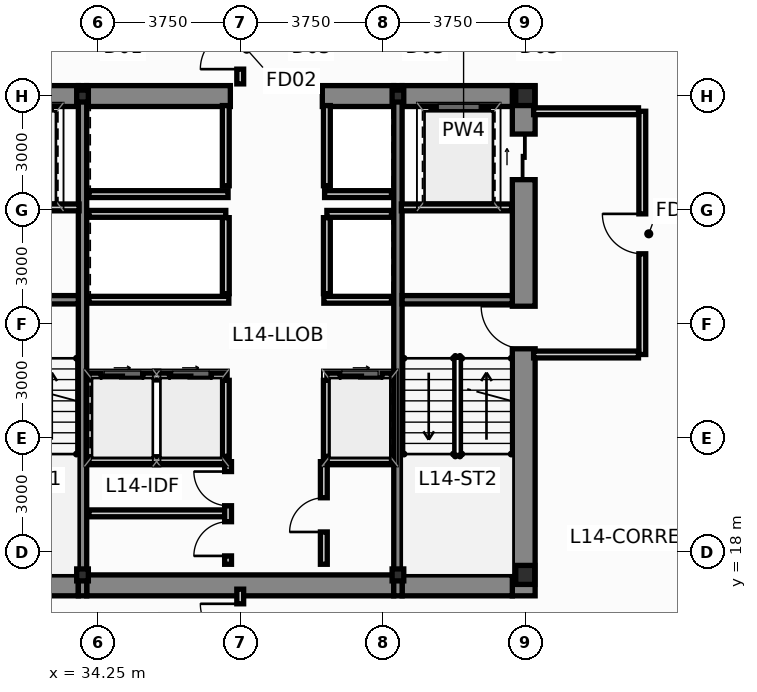
"""IFC4 building model, lengths in metres.
Left out: names, types, materials, properties, quantities, classifications, styles, units other than length and angle.
Written with IfcOpenShell. Run it as: python <this file> out.ifc"""

import sys

from ifc_helpers import new_model, si_unit, direction, frame, frame_2d, origin, origin_2d, place, context, subcontext, project, spatial, rectangle, i_section, extrude, source, transform, mapped, element, fill, save


model = new_model("IFC4")
c1 = context("Model", 3, precision=1e-05, world=origin(), true_north=direction((0.0, 1.0)))
c2 = subcontext(c1, "Body", "Model", "MODEL_VIEW")
j1 = project(units=[si_unit("LENGTHUNIT", "METRE"), si_unit("PLANEANGLEUNIT", "RADIAN")], contexts=[c1])
p1 = place(None, origin())
s1 = spatial("IfcSite", under=j1, at=p1, CompositionType="ELEMENT")
p2 = place(p1, origin())
s2 = spatial("IfcBuilding", under=s1, at=p2, CompositionType="ELEMENT")
p3 = place(p2, frame((0.0, 0.0, 56.8)))
s3 = spatial("IfcBuildingStorey", under=s2, at=p3, CompositionType="ELEMENT", Elevation=56.8)
m1 = source(origin(), c2, "Body", "SweptSolid", [
    extrude(i_section(OverallWidth=0.5, OverallDepth=0.5, WebThickness=0.028, FlangeThickness=0.04, at=origin_2d()), origin(), (0.0, 0.0, 1.0), 3.65),
])
for number, where, z_axis, x_axis in (
    (1, (45.5, 17.4, 0.0), (0.0, 0.0, 1.0), (1.0, 0.0, 0.0)),
    (2, (45.5, 30.0, 0.0), (0.0, 0.0, 1.0), (1.0, 0.0, 0.0)),
):
    element("IfcColumn", number, at=place(p3, frame(where, z_axis=z_axis, x_axis=x_axis)), inside=s3, PredefinedType="COLUMN", context=c2, shape_type="MappedRepresentation", body=[
        mapped(m1, transform((0.0, 0.0, 0.0), scale=1.0)),
    ])
m2 = source(origin(), c2, "Body", "SweptSolid", [
    extrude(i_section(OverallWidth=0.307, OverallDepth=0.315, WebThickness=0.012, FlangeThickness=0.019, at=origin_2d()), origin(), (0.0, 0.0, 1.0), 3.65),
])
for number, where, z_axis, x_axis in (
    (3, (33.85, 17.4, 0.0), (0.0, 0.0, 1.0), (1.0, 0.0, 0.0)),
    (4, (42.15, 17.4, 0.0), (0.0, 0.0, 1.0), (1.0, 0.0, 0.0)),
    (5, (33.85, 30.0, 0.0), (0.0, 0.0, 1.0), (1.0, 0.0, 0.0)),
    (6, (42.15, 30.0, 0.0), (0.0, 0.0, 1.0), (1.0, 0.0, 0.0)),
):
    element("IfcColumn", number, at=place(p3, frame(where, z_axis=z_axis, x_axis=x_axis)), inside=s3, PredefinedType="COLUMN", context=c2, shape_type="MappedRepresentation", body=[
        mapped(m2, transform((0.0, 0.0, 0.0), scale=1.0)),
    ])
p4 = place(p3, frame((45.46, 16.85, 0.0), z_axis=(0.0, 0.0, 1.0), x_axis=(0.0, 1.0, 0.0)))
e7 = element("IfcWall", 7, at=p4, inside=s3, PredefinedType="SHEAR", context=c2, shape_type="SweptSolid", body=[
    extrude(rectangle(XDim=13.425, YDim=0.6, at=frame_2d((6.712, 0.0))), origin(), (0.0, 0.0, 1.0), 3.65),
])
p5 = place(p4, frame((6.5, 0.0, 0.0)))
e8 = element("IfcOpeningElement", 8, at=p5, cuts=e7, PredefinedType="OPENING", context=c2, shape_type="SweptSolid", body=[
    extrude(rectangle(XDim=1.12, YDim=2.15, at=frame_2d((0.56, 1.075))), frame((0.0, 0.312, 0.0), z_axis=(0.0, -1.0, 0.0), x_axis=(1.0, 0.0, 0.0)), (0.0, 0.0, 1.0), 0.624),
])
p6 = place(p4, frame((10.95, 0.0, 0.0)))
e9 = element("IfcOpeningElement", 9, at=p6, cuts=e7, PredefinedType="OPENING", context=c2, shape_type="SweptSolid", body=[
    extrude(rectangle(XDim=1.2, YDim=2.2, at=frame_2d((0.6, 1.1))), frame((0.0, 0.312, 0.0), z_axis=(0.0, -1.0, 0.0), x_axis=(1.0, 0.0, 0.0)), (0.0, 0.0, 1.0), 0.624),
])
p7 = place(p3, frame((30.84, 17.125, 0.0), z_axis=(0.0, 0.0, 1.0), x_axis=(1.0, 0.0, 0.0)))
e10 = element("IfcWall", 10, at=p7, inside=s3, PredefinedType="SHEAR", context=c2, shape_type="SweptSolid", body=[
    extrude(rectangle(XDim=2.9, YDim=0.55, at=frame_2d((1.45, 0.0))), origin(), (0.0, 0.0, 1.0), 3.65),
])
p8 = place(p3, frame((33.96, 17.125, 0.0), z_axis=(0.0, 0.0, 1.0), x_axis=(1.0, 0.0, 0.0)))
e11 = element("IfcWall", 11, at=p8, inside=s3, PredefinedType="SHEAR", context=c2, shape_type="SweptSolid", body=[
    extrude(rectangle(XDim=8.08, YDim=0.55, at=frame_2d((4.04, 0.0))), origin(), (0.0, 0.0, 1.0), 3.65),
])
for number, where, z_axis, x_axis in (
    (12, (42.26, 17.125, 0.0), (0.0, 0.0, 1.0), (1.0, 0.0, 0.0)),
    (13, (30.84, 30.0, 0.0), (0.0, 0.0, 1.0), (1.0, 0.0, 0.0)),
):
    element("IfcWall", number, at=place(p3, frame(where, z_axis=z_axis, x_axis=x_axis)), inside=s3, PredefinedType="SHEAR", context=c2, shape_type="SweptSolid", body=[
        extrude(rectangle(XDim=2.9, YDim=0.55, at=frame_2d((1.45, 0.0))), origin(), (0.0, 0.0, 1.0), 3.65),
    ])
p9 = place(p3, frame((33.96, 30.0, 0.0), z_axis=(0.0, 0.0, 1.0), x_axis=(1.0, 0.0, 0.0)))
e14 = element("IfcWall", 14, at=p9, inside=s3, PredefinedType="SHEAR", context=c2, shape_type="SweptSolid", body=[
    extrude(rectangle(XDim=3.78, YDim=0.55, at=frame_2d((1.89, 0.0))), origin(), (0.0, 0.0, 1.0), 3.65),
])
p10 = place(p3, frame((40.16, 30.0, 0.0), z_axis=(0.0, 0.0, 1.0), x_axis=(1.0, 0.0, 0.0)))
e15 = element("IfcWall", 15, at=p10, inside=s3, PredefinedType="SHEAR", context=c2, shape_type="SweptSolid", body=[
    extrude(rectangle(XDim=1.88, YDim=0.55, at=frame_2d((0.94, 0.0))), origin(), (0.0, 0.0, 1.0), 3.65),
])
p11 = place(p3, frame((42.26, 30.0, 0.0), z_axis=(0.0, 0.0, 1.0), x_axis=(1.0, 0.0, 0.0)))
e16 = element("IfcWall", 16, at=p11, inside=s3, PredefinedType="SHEAR", context=c2, shape_type="SweptSolid", body=[
    extrude(rectangle(XDim=2.9, YDim=0.55, at=frame_2d((1.45, 0.0))), origin(), (0.0, 0.0, 1.0), 3.65),
])
for number, where, z_axis, x_axis in (
    (17, (33.85, 16.85, 0.0), (0.0, 0.0, 1.0), (0.0, 1.0, 0.0)),
    (18, (42.15, 16.85, 0.0), (0.0, 0.0, 1.0), (0.0, 1.0, 0.0)),
):
    element("IfcWall", number, at=place(p3, frame(where, z_axis=z_axis, x_axis=x_axis)), inside=s3, PredefinedType="SHEAR", context=c2, shape_type="SweptSolid", body=[
        extrude(rectangle(XDim=13.425, YDim=0.22, at=frame_2d((6.712, 0.0))), origin(), (0.0, 0.0, 1.0), 3.65),
    ])
for number, where, z_axis, x_axis in (
    (19, (30.84, 24.64, 0.0), (0.0, 0.0, 1.0), (1.0, 0.0, 0.0)),
    (20, (42.26, 24.64, 0.0), (0.0, 0.0, 1.0), (1.0, 0.0, 0.0)),
):
    element("IfcWall", number, at=place(p3, frame(where, z_axis=z_axis, x_axis=x_axis)), inside=s3, PredefinedType="SHEAR", context=c2, shape_type="SweptSolid", body=[
        extrude(rectangle(XDim=2.9, YDim=0.22, at=frame_2d((1.45, 0.0))), origin(), (0.0, 0.0, 1.0), 3.65),
    ])
p12 = place(p3, frame((34.02, 22.62, 0.0), z_axis=(0.0, 0.0, 1.0), x_axis=(1.0, 0.0, 0.0)))
e21 = element("IfcWall", 21, at=p12, inside=s3, PredefinedType="PARTITIONING", context=c2, shape_type="SweptSolid", body=[
    extrude(rectangle(XDim=3.6, YDim=0.18, at=frame_2d((1.8, 0.0))), origin(), (0.0, 0.0, 1.0), 3.4),
])
p13 = place(p12, frame((0.32, 0.0, 0.0)))
e22 = element("IfcOpeningElement", 22, at=p13, cuts=e21, PredefinedType="OPENING", context=c2, shape_type="SweptSolid", body=[
    extrude(rectangle(XDim=1.1, YDim=2.2, at=frame_2d((0.55, 1.1))), frame((0.0, 0.102, 0.0), z_axis=(0.0, -1.0, 0.0), x_axis=(1.0, 0.0, 0.0)), (0.0, 0.0, 1.0), 0.204),
])
p14 = place(p12, frame((2.12, 0.0, 0.0)))
e23 = element("IfcOpeningElement", 23, at=p14, cuts=e21, PredefinedType="OPENING", context=c2, shape_type="SweptSolid", body=[
    extrude(rectangle(XDim=1.1, YDim=2.2, at=frame_2d((0.55, 1.1))), frame((0.0, 0.102, 0.0), z_axis=(0.0, -1.0, 0.0), x_axis=(1.0, 0.0, 0.0)), (0.0, 0.0, 1.0), 0.204),
])
p15 = place(p3, frame((40.28, 22.62, 0.0), z_axis=(0.0, 0.0, 1.0), x_axis=(1.0, 0.0, 0.0)))
e24 = element("IfcWall", 24, at=p15, inside=s3, PredefinedType="PARTITIONING", context=c2, shape_type="SweptSolid", body=[
    extrude(rectangle(XDim=1.7, YDim=0.18, at=frame_2d((0.85, 0.0))), origin(), (0.0, 0.0, 1.0), 3.4),
])
p16 = place(p15, frame((0.35, 0.0, 0.0)))
e25 = element("IfcOpeningElement", 25, at=p16, cuts=e24, PredefinedType="OPENING", context=c2, shape_type="SweptSolid", body=[
    extrude(rectangle(XDim=1.1, YDim=2.2, at=frame_2d((0.55, 1.1))), frame((0.0, 0.102, 0.0), z_axis=(0.0, -1.0, 0.0), x_axis=(1.0, 0.0, 0.0)), (0.0, 0.0, 1.0), 0.204),
])
for number, where, z_axis, x_axis in (
    (26, (37.62, 20.52, 0.0), (0.0, 0.0, 1.0), (0.0, 1.0, 0.0)),
    (27, (40.28, 20.52, 0.0), (0.0, 0.0, 1.0), (0.0, 1.0, 0.0)),
):
    element("IfcWall", number, at=place(p3, frame(where, z_axis=z_axis, x_axis=x_axis)), inside=s3, PredefinedType="PARTITIONING", context=c2, shape_type="SweptSolid", body=[
        extrude(rectangle(XDim=2.0, YDim=0.18, at=frame_2d((1.0, 0.0))), origin(), (0.0, 0.0, 1.0), 3.4),
    ])
p17 = place(p3, frame((34.02, 26.9, 0.0), z_axis=(0.0, 0.0, 1.0), x_axis=(1.0, 0.0, 0.0)))
e28 = element("IfcWall", 28, at=p17, inside=s3, PredefinedType="PARTITIONING", context=c2, shape_type="SweptSolid", body=[
    extrude(rectangle(XDim=3.6, YDim=0.18, at=frame_2d((1.8, 0.0))), origin(), (0.0, 0.0, 1.0), 3.4),
])
p18 = place(p3, frame((40.28, 26.9, 0.0), z_axis=(0.0, 0.0, 1.0), x_axis=(1.0, 0.0, 0.0)))
e29 = element("IfcWall", 29, at=p18, inside=s3, PredefinedType="PARTITIONING", context=c2, shape_type="SweptSolid", body=[
    extrude(rectangle(XDim=1.7, YDim=0.18, at=frame_2d((0.85, 0.0))), origin(), (0.0, 0.0, 1.0), 3.4),
])
for number, where, z_axis, x_axis in (
    (30, (37.62, 24.8, 0.0), (0.0, 0.0, 1.0), (0.0, 1.0, 0.0)),
    (31, (40.28, 24.8, 0.0), (0.0, 0.0, 1.0), (0.0, 1.0, 0.0)),
):
    element("IfcWall", number, at=place(p3, frame(where, z_axis=z_axis, x_axis=x_axis)), inside=s3, PredefinedType="PARTITIONING", context=c2, shape_type="SweptSolid", body=[
        extrude(rectangle(XDim=2.0, YDim=0.18, at=frame_2d((1.0, 0.0))), origin(), (0.0, 0.0, 1.0), 3.4),
    ])
p19 = place(p3, frame((34.02, 24.64, 0.0), z_axis=(0.0, 0.0, 1.0), x_axis=(1.0, 0.0, 0.0)))
e32 = element("IfcWall", 32, at=p19, inside=s3, PredefinedType="PARTITIONING", context=c2, shape_type="SweptSolid", body=[
    extrude(rectangle(XDim=3.68, YDim=0.18, at=frame_2d((1.84, 0.0))), origin(), (0.0, 0.0, 1.0), 3.4),
])
p20 = place(p3, frame((40.2, 24.64, 0.0), z_axis=(0.0, 0.0, 1.0), x_axis=(1.0, 0.0, 0.0)))
e33 = element("IfcWall", 33, at=p20, inside=s3, PredefinedType="PARTITIONING", context=c2, shape_type="SweptSolid", body=[
    extrude(rectangle(XDim=1.78, YDim=0.18, at=frame_2d((0.89, 0.0))), origin(), (0.0, 0.0, 1.0), 3.4),
])
p21 = place(p3, frame((34.02, 27.42, 0.0), z_axis=(0.0, 0.0, 1.0), x_axis=(1.0, 0.0, 0.0)))
e34 = element("IfcWall", 34, at=p21, inside=s3, PredefinedType="PARTITIONING", context=c2, shape_type="SweptSolid", body=[
    extrude(rectangle(XDim=3.66, YDim=0.18, at=frame_2d((1.83, 0.0))), origin(), (0.0, 0.0, 1.0), 3.4),
])
p22 = place(p3, frame((40.22, 27.42, 0.0), z_axis=(0.0, 0.0, 1.0), x_axis=(1.0, 0.0, 0.0)))
e35 = element("IfcWall", 35, at=p22, inside=s3, PredefinedType="PARTITIONING", context=c2, shape_type="SweptSolid", body=[
    extrude(rectangle(XDim=1.76, YDim=0.18, at=frame_2d((0.88, 0.0))), origin(), (0.0, 0.0, 1.0), 3.4),
])
for number, where, z_axis, x_axis in (
    (36, (37.62, 27.64, 0.0), (0.0, 0.0, 1.0), (0.0, 1.0, 0.0)),
    (37, (40.28, 27.64, 0.0), (0.0, 0.0, 1.0), (0.0, 1.0, 0.0)),
):
    element("IfcWall", number, at=place(p3, frame(where, z_axis=z_axis, x_axis=x_axis)), inside=s3, PredefinedType="PARTITIONING", context=c2, shape_type="SweptSolid", body=[
        extrude(rectangle(XDim=2.11, YDim=0.18, at=frame_2d((1.055, 0.0))), origin(), (0.0, 0.0, 1.0), 3.4),
    ])
p23 = place(p3, frame((48.58, 23.2, 0.0), z_axis=(0.0, 0.0, 1.0), x_axis=(0.0, 1.0, 0.0)))
e38 = element("IfcWall", 38, at=p23, inside=s3, PredefinedType="PARTITIONING", context=c2, shape_type="SweptSolid", body=[
    extrude(rectangle(XDim=6.4, YDim=0.18, at=frame_2d((3.2, 0.0))), origin(), (0.0, 0.0, 1.0), 3.4),
])
p24 = place(p23, frame((2.65, 0.0, 0.0)))
e39 = element("IfcOpeningElement", 39, at=p24, cuts=e38, PredefinedType="OPENING", context=c2, shape_type="SweptSolid", body=[
    extrude(rectangle(XDim=1.05, YDim=2.15, at=frame_2d((0.525, 1.075))), frame((0.0, 0.102, 0.0), z_axis=(0.0, -1.0, 0.0), x_axis=(1.0, 0.0, 0.0)), (0.0, 0.0, 1.0), 0.204),
])
p25 = place(p3, frame((45.72, 23.2, 0.0), z_axis=(0.0, 0.0, 1.0), x_axis=(1.0, 0.0, 0.0)))
e40 = element("IfcWall", 40, at=p25, inside=s3, PredefinedType="PARTITIONING", context=c2, shape_type="SweptSolid", body=[
    extrude(rectangle(XDim=2.76, YDim=0.18, at=frame_2d((1.38, 0.0))), origin(), (0.0, 0.0, 1.0), 3.4),
])
p26 = place(p3, frame((45.72, 29.6, 0.0), z_axis=(0.0, 0.0, 1.0), x_axis=(1.0, 0.0, 0.0)))
e41 = element("IfcWall", 41, at=p26, inside=s3, PredefinedType="PARTITIONING", context=c2, shape_type="SweptSolid", body=[
    extrude(rectangle(XDim=2.76, YDim=0.18, at=frame_2d((1.38, 0.0))), origin(), (0.0, 0.0, 1.0), 2.783),
])
for number, where, z_axis, x_axis in (
    (42, (30.86, 27.07, 0.0), (0.0, 0.0, 1.0), (1.0, 0.0, 0.0)),
    (43, (42.24, 27.07, 0.0), (0.0, 0.0, 1.0), (1.0, 0.0, 0.0)),
):
    element("IfcWall", number, at=place(p3, frame(where, z_axis=z_axis, x_axis=x_axis)), inside=s3, PredefinedType="PARTITIONING", context=c2, shape_type="SweptSolid", body=[
        extrude(rectangle(XDim=2.9, YDim=0.18, at=frame_2d((1.45, 0.0))), origin(), (0.0, 0.0, 1.0), 3.4),
    ])
p27 = place(p3, frame((34.02, 20.42, 0.0), z_axis=(0.0, 0.0, 1.0), x_axis=(1.0, 0.0, 0.0)))
e44 = element("IfcWall", 44, at=p27, inside=s3, PredefinedType="PARTITIONING", context=c2, shape_type="SweptSolid", body=[
    extrude(rectangle(XDim=3.64, YDim=0.18, at=frame_2d((1.82, 0.0))), origin(), (0.0, 0.0, 1.0), 3.4),
])
p28 = place(p3, frame((40.22, 20.42, 0.0), z_axis=(0.0, 0.0, 1.0), x_axis=(1.0, 0.0, 0.0)))
e45 = element("IfcWall", 45, at=p28, inside=s3, PredefinedType="PARTITIONING", context=c2, shape_type="SweptSolid", body=[
    extrude(rectangle(XDim=1.76, YDim=0.18, at=frame_2d((0.88, 0.0))), origin(), (0.0, 0.0, 1.0), 3.4),
])
p29 = place(p3, frame((34.02, 19.02, 0.0), z_axis=(0.0, 0.0, 1.0), x_axis=(1.0, 0.0, 0.0)))
e46 = element("IfcWall", 46, at=p29, inside=s3, PredefinedType="PARTITIONING", context=c2, shape_type="SweptSolid", body=[
    extrude(rectangle(XDim=3.58, YDim=0.18, at=frame_2d((1.79, 0.0))), origin(), (0.0, 0.0, 1.0), 3.4),
])
p30 = place(p3, frame((37.68, 17.68, 0.0), z_axis=(0.0, 0.0, 1.0), x_axis=(0.0, 1.0, 0.0)))
e47 = element("IfcWall", 47, at=p30, inside=s3, PredefinedType="PARTITIONING", context=c2, shape_type="SweptSolid", body=[
    extrude(rectangle(XDim=2.7, YDim=0.18, at=frame_2d((1.35, 0.0))), origin(), (0.0, 0.0, 1.0), 3.4),
])
p31 = place(p30, frame((0.22, 0.0, 0.0)))
e48 = element("IfcOpeningElement", 48, at=p31, cuts=e47, PredefinedType="OPENING", context=c2, shape_type="SweptSolid", body=[
    extrude(rectangle(XDim=0.9, YDim=2.1, at=frame_2d((0.45, 1.05))), frame((0.0, 0.102, 0.0), z_axis=(0.0, -1.0, 0.0), x_axis=(1.0, 0.0, 0.0)), (0.0, 0.0, 1.0), 0.204),
])
p32 = place(p30, frame((1.54, 0.0, 0.0)))
e49 = element("IfcOpeningElement", 49, at=p32, cuts=e47, PredefinedType="OPENING", context=c2, shape_type="SweptSolid", body=[
    extrude(rectangle(XDim=0.9, YDim=2.1, at=frame_2d((0.45, 1.05))), frame((0.0, 0.102, 0.0), z_axis=(0.0, -1.0, 0.0), x_axis=(1.0, 0.0, 0.0)), (0.0, 0.0, 1.0), 0.204),
])
p33 = place(p3, frame((40.2, 17.68, 0.0), z_axis=(0.0, 0.0, 1.0), x_axis=(0.0, 1.0, 0.0)))
e50 = element("IfcWall", 50, at=p33, inside=s3, PredefinedType="PARTITIONING", context=c2, shape_type="SweptSolid", body=[
    extrude(rectangle(XDim=2.7, YDim=0.18, at=frame_2d((1.35, 0.0))), origin(), (0.0, 0.0, 1.0), 3.4),
])
p34 = place(p33, frame((0.85, 0.0, 0.0)))
e51 = element("IfcOpeningElement", 51, at=p34, cuts=e50, PredefinedType="OPENING", context=c2, shape_type="SweptSolid", body=[
    extrude(rectangle(XDim=0.9, YDim=2.1, at=frame_2d((0.45, 1.05))), frame((0.0, 0.102, 0.0), z_axis=(0.0, -1.0, 0.0), x_axis=(1.0, 0.0, 0.0)), (0.0, 0.0, 1.0), 0.204),
])
p35 = place(p3, frame((38.0, 15.205, 0.0), z_axis=(0.0, 0.0, 1.0), x_axis=(0.0, 1.0, 0.0)))
e52 = element("IfcWall", 52, at=p35, inside=s3, PredefinedType="PARTITIONING", context=c2, shape_type="SweptSolid", body=[
    extrude(rectangle(XDim=1.82, YDim=0.18, at=frame_2d((0.91, 0.0))), origin(), (0.0, 0.0, 1.0), 3.4),
])
p36 = place(p35, frame((0.385, 0.0, 0.0)))
e53 = element("IfcOpeningElement", 53, at=p36, cuts=e52, PredefinedType="OPENING", context=c2, shape_type="SweptSolid", body=[
    extrude(rectangle(XDim=1.05, YDim=2.15, at=frame_2d((0.525, 1.075))), frame((0.0, 0.102, 0.0), z_axis=(0.0, -1.0, 0.0), x_axis=(1.0, 0.0, 0.0)), (0.0, 0.0, 1.0), 0.204),
])
p37 = place(p3, frame((38.0, 30.32, 0.0), z_axis=(0.0, 0.0, 1.0), x_axis=(0.0, 1.0, 0.0)))
e54 = element("IfcWall", 54, at=p37, inside=s3, PredefinedType="PARTITIONING", context=c2, shape_type="SweptSolid", body=[
    extrude(rectangle(XDim=1.825, YDim=0.18, at=frame_2d((0.913, 0.0))), origin(), (0.0, 0.0, 1.0), 3.4),
])
p38 = place(p37, frame((0.388, 0.0, 0.0)))
e55 = element("IfcOpeningElement", 55, at=p38, cuts=e54, PredefinedType="OPENING", context=c2, shape_type="SweptSolid", body=[
    extrude(rectangle(XDim=1.05, YDim=2.15, at=frame_2d((0.525, 1.075))), frame((0.0, 0.102, 0.0), z_axis=(0.0, -1.0, 0.0), x_axis=(1.0, 0.0, 0.0)), (0.0, 0.0, 1.0), 0.204),
])
p39 = place(p5, origin())
e56 = element("IfcDoor", 56, at=p39, inside=s3, OperationType="SINGLE_SWING_RIGHT", PredefinedType="DOOR", context=c2, shape_type="SweptSolid", body=[
    extrude(rectangle(XDim=1.12, YDim=2.15, at=frame_2d((0.56, 1.075))), frame((0.0, 0.025, 0.0), z_axis=(0.0, -1.0, 0.0), x_axis=(1.0, 0.0, 0.0)), (0.0, 0.0, 1.0), 0.05),
])
fill(e8, e56)
p40 = place(p6, origin())
e57 = element("IfcDoor", 57, at=p40, inside=s3, OperationType="SLIDING_TO_RIGHT", PredefinedType="DOOR", context=c2, shape_type="SweptSolid", body=[
    extrude(rectangle(XDim=1.2, YDim=2.2, at=frame_2d((0.6, 1.1))), frame((0.0, 0.025, 0.0), z_axis=(0.0, -1.0, 0.0), x_axis=(1.0, 0.0, 0.0)), (0.0, 0.0, 1.0), 0.05),
])
fill(e9, e57)
p41 = place(p13, origin())
e58 = element("IfcDoor", 58, at=p41, inside=s3, OperationType="SLIDING_TO_LEFT", PredefinedType="DOOR", context=c2, shape_type="SweptSolid", body=[
    extrude(rectangle(XDim=1.1, YDim=2.2, at=frame_2d((0.55, 1.1))), frame((0.0, 0.025, 0.0), z_axis=(0.0, -1.0, 0.0), x_axis=(1.0, 0.0, 0.0)), (0.0, 0.0, 1.0), 0.05),
])
fill(e22, e58)
p42 = place(p14, origin())
e59 = element("IfcDoor", 59, at=p42, inside=s3, OperationType="SLIDING_TO_RIGHT", PredefinedType="DOOR", context=c2, shape_type="SweptSolid", body=[
    extrude(rectangle(XDim=1.1, YDim=2.2, at=frame_2d((0.55, 1.1))), frame((0.0, 0.025, 0.0), z_axis=(0.0, -1.0, 0.0), x_axis=(1.0, 0.0, 0.0)), (0.0, 0.0, 1.0), 0.05),
])
fill(e23, e59)
p43 = place(p16, origin())
e60 = element("IfcDoor", 60, at=p43, inside=s3, OperationType="SLIDING_TO_LEFT", PredefinedType="DOOR", context=c2, shape_type="SweptSolid", body=[
    extrude(rectangle(XDim=1.1, YDim=2.2, at=frame_2d((0.55, 1.1))), frame((0.0, 0.025, 0.0), z_axis=(0.0, -1.0, 0.0), x_axis=(1.0, 0.0, 0.0)), (0.0, 0.0, 1.0), 0.05),
])
fill(e25, e60)
p44 = place(p24, origin())
e61 = element("IfcDoor", 61, at=p44, inside=s3, OperationType="SINGLE_SWING_RIGHT", PredefinedType="DOOR", context=c2, shape_type="SweptSolid", body=[
    extrude(rectangle(XDim=1.05, YDim=2.15, at=frame_2d((0.525, 1.075))), frame((0.0, 0.025, 0.0), z_axis=(0.0, -1.0, 0.0), x_axis=(1.0, 0.0, 0.0)), (0.0, 0.0, 1.0), 0.05),
])
fill(e39, e61)
p45 = place(p31, origin())
e62 = element("IfcDoor", 62, at=p45, inside=s3, OperationType="SINGLE_SWING_LEFT", PredefinedType="DOOR", context=c2, shape_type="SweptSolid", body=[
    extrude(rectangle(XDim=0.9, YDim=2.1, at=frame_2d((0.45, 1.05))), frame((0.0, 0.025, 0.0), z_axis=(0.0, -1.0, 0.0), x_axis=(1.0, 0.0, 0.0)), (0.0, 0.0, 1.0), 0.05),
])
fill(e48, e62)
p46 = place(p32, origin())
e63 = element("IfcDoor", 63, at=p46, inside=s3, OperationType="SINGLE_SWING_RIGHT", PredefinedType="DOOR", context=c2, shape_type="SweptSolid", body=[
    extrude(rectangle(XDim=0.9, YDim=2.1, at=frame_2d((0.45, 1.05))), frame((0.0, 0.025, 0.0), z_axis=(0.0, -1.0, 0.0), x_axis=(1.0, 0.0, 0.0)), (0.0, 0.0, 1.0), 0.05),
])
fill(e49, e63)
p47 = place(p34, origin())
e64 = element("IfcDoor", 64, at=p47, inside=s3, OperationType="SINGLE_SWING_LEFT", PredefinedType="DOOR", context=c2, shape_type="SweptSolid", body=[
    extrude(rectangle(XDim=0.9, YDim=2.1, at=frame_2d((0.45, 1.05))), frame((0.0, 0.025, 0.0), z_axis=(0.0, -1.0, 0.0), x_axis=(1.0, 0.0, 0.0)), (0.0, 0.0, 1.0), 0.05),
])
fill(e51, e64)
p48 = place(p36, origin())
e65 = element("IfcDoor", 65, at=p48, inside=s3, OperationType="SINGLE_SWING_RIGHT", PredefinedType="DOOR", context=c2, shape_type="SweptSolid", body=[
    extrude(rectangle(XDim=1.05, YDim=2.15, at=frame_2d((0.525, 1.075))), frame((0.0, 0.025, 0.0), z_axis=(0.0, -1.0, 0.0), x_axis=(1.0, 0.0, 0.0)), (0.0, 0.0, 1.0), 0.05),
])
fill(e53, e65)
p49 = place(p38, origin())
e66 = element("IfcDoor", 66, at=p49, inside=s3, OperationType="SINGLE_SWING_LEFT", PredefinedType="DOOR", context=c2, shape_type="SweptSolid", body=[
    extrude(rectangle(XDim=1.05, YDim=2.15, at=frame_2d((0.525, 1.075))), frame((0.0, 0.025, 0.0), z_axis=(0.0, -1.0, 0.0), x_axis=(1.0, 0.0, 0.0)), (0.0, 0.0, 1.0), 0.05),
])
fill(e55, e66)
save(model, sys.argv[1])
